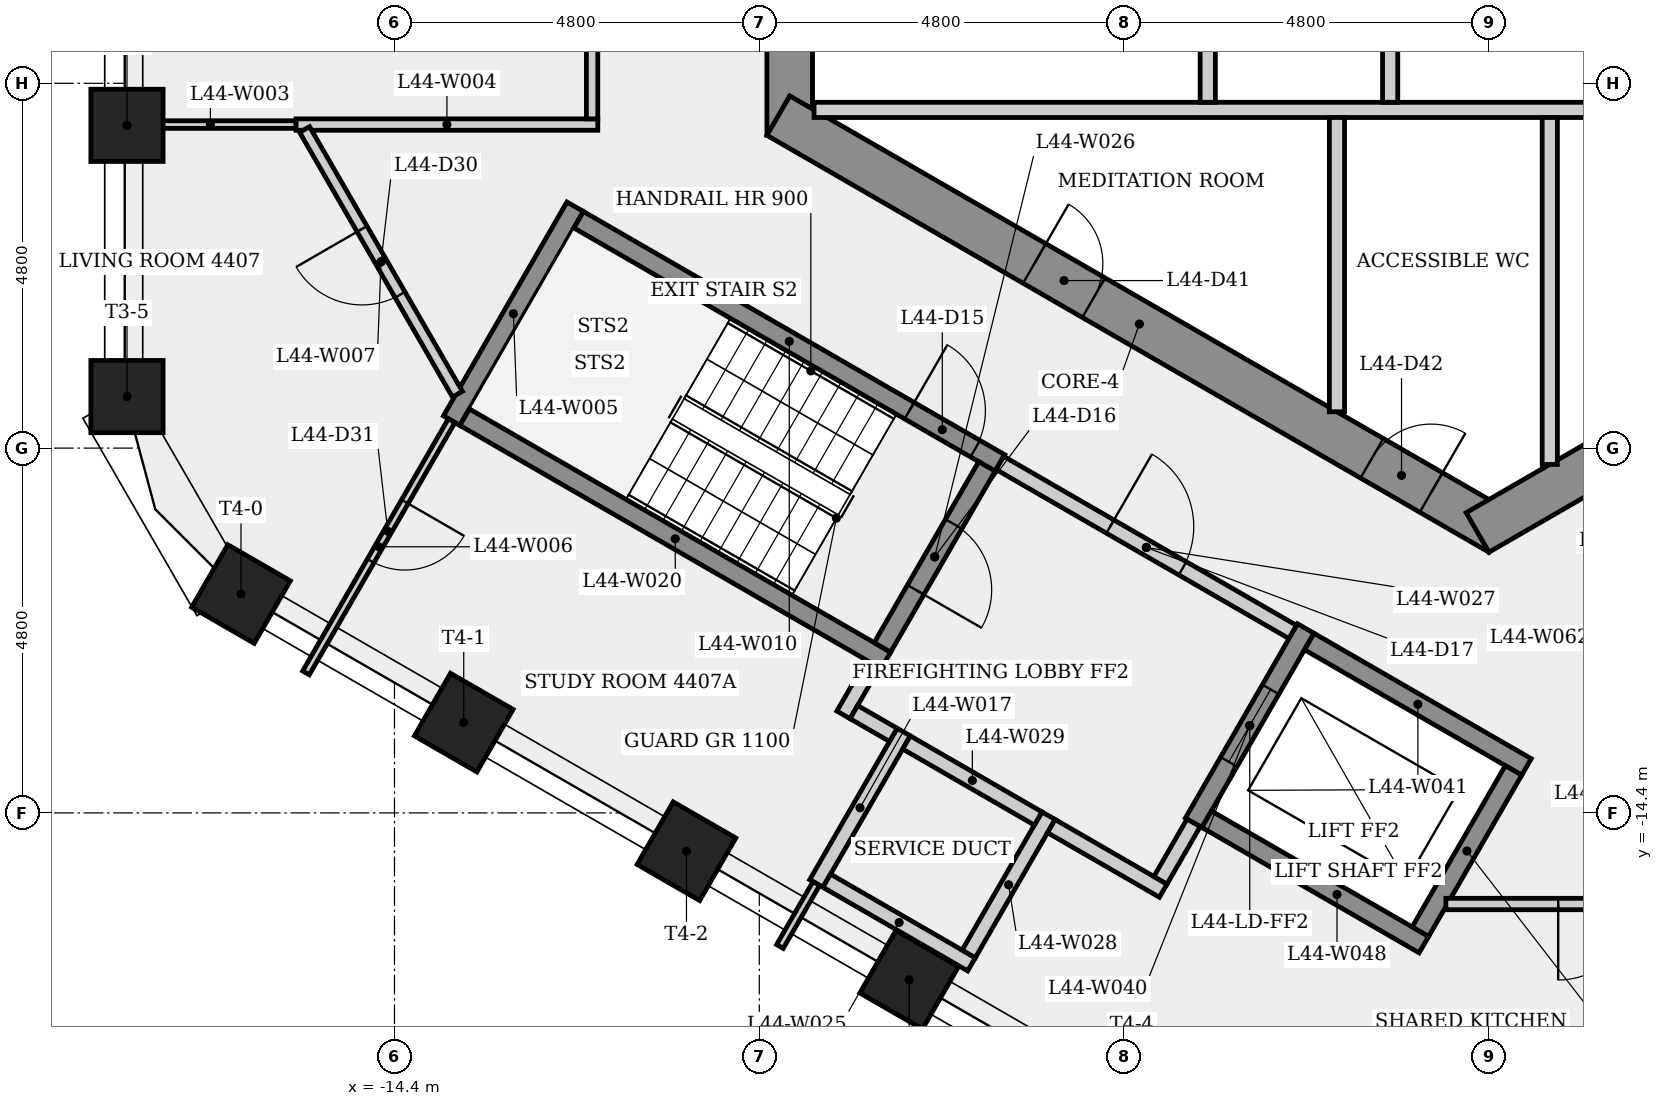
"""IFC4 building model, lengths in metres.
Left out: names, types, materials, properties, quantities, classifications, styles, units other than length and angle.
Written with IfcOpenShell. Run it as: python <this file> out.ifc"""

import sys

from ifc_helpers import new_model, si_unit, direction, frame, frame_2d, origin, origin_2d, place, context, subcontext, project, spatial, rectangle, extrude, element, fill, save


model = new_model("IFC4")
c1 = context("Model", 3, precision=1e-05, world=origin(), true_north=direction((0.0, 1.0)))
c2 = subcontext(c1, "Body", "Model", "MODEL_VIEW")
j1 = project(units=[si_unit("LENGTHUNIT", "METRE"), si_unit("PLANEANGLEUNIT", "RADIAN")], contexts=[c1])
p1 = place(None, origin())
s1 = spatial("IfcSite", under=j1, at=p1, CompositionType="ELEMENT")
p2 = place(p1, origin())
s2 = spatial("IfcBuilding", under=s1, at=p2, CompositionType="ELEMENT")
p3 = place(p2, frame((0.0, 0.0, 166.3)))
s3 = spatial("IfcBuildingStorey", under=s2, at=p3, CompositionType="ELEMENT", Elevation=166.3)
p4 = place(p3, frame((-9.2, 5.485, 0.0), z_axis=(0.0, 0.0, 1.0), x_axis=(0.0, -1.0, 0.0)))
e1 = element("IfcWall", 1, at=p4, inside=s3, PredefinedType="SHEAR", context=c2, shape_type="SweptSolid", body=[
    extrude(rectangle(XDim=10.97, YDim=0.6, at=frame_2d((5.485, 0.0))), origin(), (0.0, 0.0, 1.0), 3.4),
])
p5 = place(p4, frame((8.516, 0.0, 0.0)))
e2 = element("IfcOpeningElement", 2, at=p5, cuts=e1, PredefinedType="OPENING", context=c2, shape_type="SweptSolid", body=[
    extrude(rectangle(XDim=0.9, YDim=2.1, at=frame_2d((0.45, 1.05))), frame((0.0, 0.31, 0.0), z_axis=(0.0, -1.0, 0.0), x_axis=(1.0, 0.0, 0.0)), (0.0, 0.0, 1.0), 0.62),
])
p6 = place(p4, frame((4.685, 0.0, 0.0)))
e3 = element("IfcOpeningElement", 3, at=p6, cuts=e1, PredefinedType="OPENING", context=c2, shape_type="SweptSolid", body=[
    extrude(rectangle(XDim=1.6, YDim=2.1, at=frame_2d((0.8, 1.05))), frame((0.0, 0.31, 0.0), z_axis=(0.0, -1.0, 0.0), x_axis=(1.0, 0.0, 0.0)), (0.0, 0.0, 1.0), 0.62),
])
p7 = place(p3, frame((-9.35, -5.225, 0.0), z_axis=(0.0, 0.0, 1.0), x_axis=(0.866023993627, -0.500002442456, 0.0)))
e4 = element("IfcWall", 4, at=p7, inside=s3, PredefinedType="SHEAR", context=c2, shape_type="SweptSolid", body=[
    extrude(rectangle(XDim=10.97, YDim=0.6, at=frame_2d((5.485, 0.0))), origin(), (0.0, 0.0, 1.0), 3.4),
])
p8 = place(p7, frame((3.891, 0.0, 0.0)))
e5 = element("IfcOpeningElement", 5, at=p8, cuts=e4, PredefinedType="OPENING", context=c2, shape_type="SweptSolid", body=[
    extrude(rectangle(XDim=0.9, YDim=2.1, at=frame_2d((0.45, 1.05))), frame((0.0, 0.31, 0.0), z_axis=(0.0, -1.0, 0.0), x_axis=(1.0, 0.0, 0.0)), (0.0, 0.0, 1.0), 0.62),
])
p9 = place(p7, frame((9.018, 0.0, 0.0)))
e6 = element("IfcOpeningElement", 6, at=p9, cuts=e4, PredefinedType="OPENING", context=c2, shape_type="SweptSolid", body=[
    extrude(rectangle(XDim=0.9, YDim=2.1, at=frame_2d((0.45, 1.05))), frame((0.0, 0.31, 0.0), z_axis=(0.0, -1.0, 0.0), x_axis=(1.0, 0.0, 0.0)), (0.0, 0.0, 1.0), 0.62),
])
p10 = place(p3, frame((-0.15, -10.71, 0.0), z_axis=(0.0, 0.0, 1.0), x_axis=(0.866023993627, 0.500002442456, 0.0)))
e7 = element("IfcWall", 7, at=p10, inside=s3, PredefinedType="SHEAR", context=c2, shape_type="SweptSolid", body=[
    extrude(rectangle(XDim=10.97, YDim=0.6, at=frame_2d((5.485, 0.0))), origin(), (0.0, 0.0, 1.0), 3.4),
])
p11 = place(p10, frame((7.166, 0.0, 0.0)))
e8 = element("IfcOpeningElement", 8, at=p11, cuts=e7, PredefinedType="OPENING", context=c2, shape_type="SweptSolid", body=[
    extrude(rectangle(XDim=0.9, YDim=2.1, at=frame_2d((0.45, 1.05))), frame((0.0, 0.31, 0.0), z_axis=(0.0, -1.0, 0.0), x_axis=(1.0, 0.0, 0.0)), (0.0, 0.0, 1.0), 0.62),
])
for number, where, z_axis, x_axis in (
    (9, (-17.919, -5.353, 0.0), (0.0, 0.0, 1.0), (-1.0, 0.0, 0.0)),
    (10, (-17.919, -8.922, 0.0), (0.0, 0.0, 1.0), (-1.0, 0.0, 0.0)),
    (11, (-16.419, -11.52, 0.0), (0.0, 0.0, 1.0), (-0.5, -0.866, 0.0)),
    (12, (-13.489, -13.212, 0.0), (0.0, 0.0, 1.0), (-0.5, -0.866, 0.0)),
    (13, (-10.559, -14.904, 0.0), (0.0, 0.0, 1.0), (-0.5, -0.866, 0.0)),
    (14, (-7.628, -16.596, 0.0), (0.0, 0.0, 1.0), (-0.5, -0.866, 0.0)),
):
    element("IfcColumn", number, at=place(p3, frame(where, z_axis=z_axis, x_axis=x_axis)), inside=s3, PredefinedType="COLUMN", context=c2, shape_type="SweptSolid", body=[
        extrude(rectangle(XDim=0.95, YDim=0.95, at=origin_2d()), origin(), (0.0, 0.0, 1.0), 3.4),
    ])
p12 = place(p3, frame((-15.695, -5.343, 0.0), z_axis=(0.0, 0.0, 1.0), x_axis=(-1.0, 0.0, 0.0)))
e15 = element("IfcWall", 15, at=p12, inside=s3, PredefinedType="PARTITIONING", context=c2, shape_type="SweptSolid", body=[
    extrude(rectangle(XDim=2.254, YDim=0.1, at=frame_2d((1.127, 0.0))), origin(), (0.0, 0.0, 1.0), 3.05),
])
p13 = place(p3, frame((-15.695, -5.343, 0.0), z_axis=(0.0, 0.0, 1.0), x_axis=(1.0, 0.0, 0.0)))
e16 = element("IfcWall", 16, at=p13, inside=s3, PredefinedType="PARTITIONING", context=c2, shape_type="SweptSolid", body=[
    extrude(rectangle(XDim=3.97, YDim=0.15, at=frame_2d((1.985, 0.0))), origin(), (0.0, 0.0, 1.0), 3.05),
])
p14 = place(p3, frame((-13.648, -9.239, 0.0), z_axis=(0.0, 0.0, 1.0), x_axis=(0.500017246033, 0.866015446554, 0.0)))
e17 = element("IfcWall", 17, at=p14, inside=s3, PredefinedType="SHEAR", context=c2, shape_type="SweptSolid", body=[
    extrude(rectangle(XDim=3.25, YDim=0.25, at=frame_2d((1.625, 0.0))), origin(), (0.0, 0.0, 1.0), 3.05),
])
p15 = place(p3, frame((-13.648, -9.239, 0.0), z_axis=(0.0, 0.0, 1.0), x_axis=(-0.500044099915, -0.86599994119, 0.0)))
e18 = element("IfcWall", 18, at=p15, inside=s3, PredefinedType="PARTITIONING", context=c2, shape_type="SweptSolid", body=[
    extrude(rectangle(XDim=3.833, YDim=0.1, at=frame_2d((1.917, 0.0))), origin(), (0.0, 0.0, 1.0), 3.05),
])
p16 = place(p15, frame((1.231, 0.0, 0.0)))
e19 = element("IfcOpeningElement", 19, at=p16, cuts=e18, PredefinedType="OPENING", context=c2, shape_type="SweptSolid", body=[
    extrude(rectangle(XDim=0.9, YDim=2.1, at=frame_2d((0.45, 1.05))), frame((0.0, 0.06, 0.0), z_axis=(0.0, -1.0, 0.0), x_axis=(1.0, 0.0, 0.0)), (0.0, 0.0, 1.0), 0.12),
])
p17 = place(p3, frame((-13.572, -8.891, 0.0), z_axis=(0.0, 0.0, 1.0), x_axis=(-0.500004480819, 0.866022816767, 0.0)))
e20 = element("IfcWall", 20, at=p17, inside=s3, PredefinedType="PARTITIONING", context=c2, shape_type="SweptSolid", body=[
    extrude(rectangle(XDim=4.021, YDim=0.15, at=frame_2d((2.011, 0.0))), origin(), (0.0, 0.0, 1.0), 3.05),
])
p18 = place(p17, frame((1.511, 0.0, 0.0)))
e21 = element("IfcOpeningElement", 21, at=p18, cuts=e20, PredefinedType="OPENING", context=c2, shape_type="SweptSolid", body=[
    extrude(rectangle(XDim=1.0, YDim=2.1, at=frame_2d((0.5, 1.05))), frame((0.0, 0.085, 0.0), z_axis=(0.0, -1.0, 0.0), x_axis=(1.0, 0.0, 0.0)), (0.0, 0.0, 1.0), 0.17),
])
p19 = place(p3, frame((-11.977, -6.595, 0.0), z_axis=(0.0, 0.0, 1.0), x_axis=(0.866025499775, -0.499999833739, 0.0)))
e22 = element("IfcWall", 22, at=p19, inside=s3, PredefinedType="SHEAR", context=c2, shape_type="SweptSolid", body=[
    extrude(rectangle(XDim=6.4, YDim=0.25, at=frame_2d((3.2, 0.0))), origin(), (0.0, 0.0, 1.0), 3.05),
])
p20 = place(p19, frame((5.025, 0.0, 0.0)))
e23 = element("IfcOpeningElement", 23, at=p20, cuts=e22, PredefinedType="OPENING", context=c2, shape_type="SweptSolid", body=[
    extrude(rectangle(XDim=1.0, YDim=2.1, at=frame_2d((0.5, 1.05))), frame((0.0, 0.135, 0.0), z_axis=(0.0, -1.0, 0.0), x_axis=(1.0, 0.0, 0.0)), (0.0, 0.0, 1.0), 0.27),
])
p21 = place(p3, frame((-11.8, -5.268, 0.0), z_axis=(0.0, 0.0, 1.0), x_axis=(0.0, 1.0, 0.0)))
e24 = element("IfcWall", 24, at=p21, inside=s3, PredefinedType="PARTITIONING", context=c2, shape_type="SweptSolid", body=[
    extrude(rectangle(XDim=10.686, YDim=0.15, at=frame_2d((5.343, 0.0))), origin(), (0.0, 0.0, 1.0), 3.05),
])
p22 = place(p21, frame((6.585, 0.0, 0.0)))
e25 = element("IfcOpeningElement", 25, at=p22, cuts=e24, PredefinedType="OPENING", context=c2, shape_type="SweptSolid", body=[
    extrude(rectangle(XDim=1.0, YDim=2.1, at=frame_2d((0.5, 1.05))), frame((0.0, 0.085, 0.0), z_axis=(0.0, -1.0, 0.0), x_axis=(1.0, 0.0, 0.0)), (0.0, 0.0, 1.0), 0.17),
])
p23 = place(p21, frame((1.264, 0.0, 0.0)))
e26 = element("IfcOpeningElement", 26, at=p23, cuts=e24, PredefinedType="OPENING", context=c2, shape_type="SweptSolid", body=[
    extrude(rectangle(XDim=1.0, YDim=2.1, at=frame_2d((0.5, 1.05))), frame((0.0, 0.085, 0.0), z_axis=(0.0, -1.0, 0.0), x_axis=(1.0, 0.0, 0.0)), (0.0, 0.0, 1.0), 0.17),
])
p24 = place(p3, frame((-8.88, -5.15, 0.0), z_axis=(0.0, 0.0, 1.0), x_axis=(1.0, 0.0, 0.0)))
e27 = element("IfcWall", 27, at=p24, inside=s3, PredefinedType="PARTITIONING", context=c2, shape_type="SweptSolid", body=[
    extrude(rectangle(XDim=11.205, YDim=0.2, at=frame_2d((5.603, 0.0))), origin(), (0.0, 0.0, 1.0), 3.05),
])
p25 = place(p3, frame((-8.85, -15.329, 0.0), z_axis=(0.0, 0.0, 1.0), x_axis=(0.500077740698, 0.865980515519, 0.0)))
e28 = element("IfcWall", 28, at=p25, inside=s3, PredefinedType="PLUMBINGWALL", context=c2, shape_type="SweptSolid", body=[
    extrude(rectangle(XDim=2.3, YDim=0.2, at=frame_2d((1.15, 0.0))), origin(), (0.0, 0.0, 1.0), 3.05),
])
p26 = place(p3, frame((-8.85, -15.329, 0.0), z_axis=(0.0, 0.0, 1.0), x_axis=(-0.499950501706, -0.866053979752, 0.0)))
e29 = element("IfcWall", 29, at=p26, inside=s3, PredefinedType="PARTITIONING", context=c2, shape_type="SweptSolid", body=[
    extrude(rectangle(XDim=0.958, YDim=0.1, at=frame_2d((0.479, 0.0))), origin(), (0.0, 0.0, 1.0), 3.05),
])
p27 = place(p3, frame((-8.493, -13.11, 0.0), z_axis=(0.0, 0.0, 1.0), x_axis=(0.500067724834, 0.865986299303, 0.0)))
e30 = element("IfcWall", 30, at=p27, inside=s3, PredefinedType="PARTITIONING", context=c2, shape_type="SweptSolid", body=[
    extrude(rectangle(XDim=0.775, YDim=0.2, at=frame_2d((0.388, 0.0))), origin(), (0.0, 0.0, 1.0), 3.05),
])
p28 = place(p3, frame((-7.935, -12.393, 0.0), z_axis=(0.0, 0.0, 1.0), x_axis=(-0.866025499775, 0.499999833739, 0.0)))
e31 = element("IfcWall", 31, at=p28, inside=s3, PredefinedType="SHEAR", context=c2, shape_type="SweptSolid", body=[
    extrude(rectangle(XDim=6.4, YDim=0.25, at=frame_2d((3.2, 0.0))), origin(), (0.0, 0.0, 1.0), 3.05),
])
p29 = place(p3, frame((-7.836, -13.373, 0.0), z_axis=(0.0, 0.0, 1.0), x_axis=(-0.866232998003, 0.499640263761, 0.0)))
e32 = element("IfcWall", 32, at=p29, inside=s3, PredefinedType="PARTITIONING", context=c2, shape_type="SweptSolid", body=[
    extrude(rectangle(XDim=0.6, YDim=0.2, at=frame_2d((0.3, 0.0))), origin(), (0.0, 0.0, 1.0), 3.05),
])
p30 = place(p3, frame((-6.808, -16.392, 0.0), z_axis=(0.0, 0.0, 1.0), x_axis=(-0.866008176907, 0.50002983664, 0.0)))
e33 = element("IfcWall", 33, at=p30, inside=s3, PredefinedType="PLUMBINGWALL", context=c2, shape_type="SweptSolid", body=[
    extrude(rectangle(XDim=2.2, YDim=0.2, at=frame_2d((1.1, 0.0))), origin(), (0.0, 0.0, 1.0), 3.05),
])
p31 = place(p3, frame((-6.605, -9.841, 0.0), z_axis=(0.0, 0.0, 1.0), x_axis=(-0.499996545922, -0.866027397988, 0.0)))
e34 = element("IfcWall", 34, at=p31, inside=s3, PredefinedType="SHEAR", context=c2, shape_type="SweptSolid", body=[
    extrude(rectangle(XDim=2.75, YDim=0.25, at=frame_2d((1.375, 0.0))), origin(), (0.0, 0.0, 1.0), 3.05),
])
p32 = place(p31, frame((0.875, 0.0, 0.0)))
e35 = element("IfcOpeningElement", 35, at=p32, cuts=e34, PredefinedType="OPENING", context=c2, shape_type="SweptSolid", body=[
    extrude(rectangle(XDim=1.0, YDim=2.1, at=frame_2d((0.5, 1.05))), frame((0.0, 0.135, 0.0), z_axis=(0.0, -1.0, 0.0), x_axis=(1.0, 0.0, 0.0)), (0.0, 0.0, 1.0), 0.27),
])
p33 = place(p3, frame((-6.435, -9.795, 0.0), z_axis=(0.0, 0.0, 1.0), x_axis=(0.866012907634, -0.500021643343, 0.0)))
e36 = element("IfcWall", 36, at=p33, inside=s3, PredefinedType="PARTITIONING", context=c2, shape_type="SweptSolid", body=[
    extrude(rectangle(XDim=4.45, YDim=0.2, at=frame_2d((2.225, 0.0))), origin(), (0.0, 0.0, 1.0), 3.05),
])
p34 = place(p33, frame((1.675, 0.0, 0.0)))
e37 = element("IfcOpeningElement", 37, at=p34, cuts=e36, PredefinedType="OPENING", context=c2, shape_type="SweptSolid", body=[
    extrude(rectangle(XDim=1.1, YDim=2.1, at=frame_2d((0.55, 1.05))), frame((0.0, 0.11, 0.0), z_axis=(0.0, -1.0, 0.0), x_axis=(1.0, 0.0, 0.0)), (0.0, 0.0, 1.0), 0.22),
])
p35 = place(p3, frame((-5.795, -14.437, 0.0), z_axis=(0.0, 0.0, 1.0), x_axis=(-0.500027713859, -0.866009402589, 0.0)))
e38 = element("IfcWall", 38, at=p35, inside=s3, PredefinedType="PLUMBINGWALL", context=c2, shape_type="SweptSolid", body=[
    extrude(rectangle(XDim=2.1, YDim=0.2, at=frame_2d((1.05, 0.0))), origin(), (0.0, 0.0, 1.0), 3.05),
])
p36 = place(p3, frame((-5.931, -14.473, 0.0), z_axis=(0.0, 0.0, 1.0), x_axis=(-0.866041268327, 0.499972520799, 0.0)))
e39 = element("IfcWall", 39, at=p36, inside=s3, PredefinedType="PLUMBINGWALL", context=c2, shape_type="SweptSolid", body=[
    extrude(rectangle(XDim=2.0, YDim=0.2, at=frame_2d((1.0, 0.0))), origin(), (0.0, 0.0, 1.0), 3.05),
])
p37 = place(p3, frame((-4.286, -15.423, 0.0), z_axis=(0.0, 0.0, 1.0), x_axis=(-0.866025371046, 0.500000056704, 0.0)))
e40 = element("IfcWall", 40, at=p37, inside=s3, PredefinedType="PARTITIONING", context=c2, shape_type="SweptSolid", body=[
    extrude(rectangle(XDim=1.7, YDim=0.2, at=frame_2d((0.85, 0.0))), origin(), (0.0, 0.0, 1.0), 3.05),
])
p38 = place(p3, frame((-3.885, -14.529, 0.0), z_axis=(0.0, 0.0, 1.0), x_axis=(-0.499859285417, -0.866106630146, 0.0)))
e41 = element("IfcWall", 41, at=p38, inside=s3, PredefinedType="PARTITIONING", context=c2, shape_type="SweptSolid", body=[
    extrude(rectangle(XDim=0.875, YDim=0.2, at=frame_2d((0.438, 0.0))), origin(), (0.0, 0.0, 1.0), 3.05),
])
p39 = place(p3, frame((-3.7, -1.9, 0.0), z_axis=(0.0, 0.0, 1.0), x_axis=(0.0, -1.0, 0.0)))
e42 = element("IfcWall", 42, at=p39, inside=s3, PredefinedType="PARTITIONING", context=c2, shape_type="SweptSolid", body=[
    extrude(rectangle(XDim=3.15, YDim=0.2, at=frame_2d((1.575, 0.0))), origin(), (0.0, 0.0, 1.0), 3.05),
])
p40 = place(p3, frame((-2.41, -11.974, 0.0), z_axis=(0.0, 0.0, 1.0), x_axis=(-0.500001826776, -0.866024349092, 0.0)))
e43 = element("IfcWall", 43, at=p40, inside=s3, PredefinedType="SHEAR", context=c2, shape_type="SweptSolid", body=[
    extrude(rectangle(XDim=2.95, YDim=0.25, at=frame_2d((1.475, 0.0))), origin(), (0.0, 0.0, 1.0), 3.05),
])
p41 = place(p40, frame((0.925, 0.0, 0.0)))
e44 = element("IfcOpeningElement", 44, at=p41, cuts=e43, PredefinedType="OPENING", context=c2, shape_type="SweptSolid", body=[
    extrude(rectangle(XDim=1.1, YDim=2.1, at=frame_2d((0.55, 1.05))), frame((0.0, 0.135, 0.0), z_axis=(0.0, -1.0, 0.0), x_axis=(1.0, 0.0, 0.0)), (0.0, 0.0, 1.0), 0.27),
])
p42 = place(p3, frame((-2.364, -12.145, 0.0), z_axis=(0.0, 0.0, 1.0), x_axis=(0.866040211805, -0.499974350878, 0.0)))
e45 = element("IfcWall", 45, at=p42, inside=s3, PredefinedType="SHEAR", context=c2, shape_type="SweptSolid", body=[
    extrude(rectangle(XDim=3.3, YDim=0.25, at=frame_2d((1.65, 0.0))), origin(), (0.0, 0.0, 1.0), 3.05),
])
p43 = place(p3, frame((-2.0, -5.25, 0.0), z_axis=(0.0, 0.0, 1.0), x_axis=(0.0, -1.0, 0.0)))
e46 = element("IfcWall", 46, at=p43, inside=s3, PredefinedType="PARTITIONING", context=c2, shape_type="SweptSolid", body=[
    extrude(rectangle(XDim=3.872, YDim=0.2, at=frame_2d((1.936, 0.0))), origin(), (0.0, 0.0, 1.0), 3.05),
])
p44 = place(p3, frame((-1.3, -1.9, 0.0), z_axis=(0.0, 0.0, 1.0), x_axis=(0.0, -1.0, 0.0)))
e47 = element("IfcWall", 47, at=p44, inside=s3, PredefinedType="PARTITIONING", context=c2, shape_type="SweptSolid", body=[
    extrude(rectangle(XDim=3.15, YDim=0.2, at=frame_2d((1.575, 0.0))), origin(), (0.0, 0.0, 1.0), 3.05),
])
p45 = place(p3, frame((-0.856, -16.133, 0.0), z_axis=(0.0, 0.0, 1.0), x_axis=(-0.866021716278, 0.500006386895, 0.0)))
e48 = element("IfcWall", 48, at=p45, inside=s3, PredefinedType="SHEAR", context=c2, shape_type="SweptSolid", body=[
    extrude(rectangle(XDim=3.3, YDim=0.25, at=frame_2d((1.65, 0.0))), origin(), (0.0, 0.0, 1.0), 3.05),
])
p46 = place(p3, frame((-0.902, -15.962, 0.0), z_axis=(0.0, 0.0, 1.0), x_axis=(0.500061746146, 0.865989751695, 0.0)))
e49 = element("IfcWall", 49, at=p46, inside=s3, PredefinedType="SHEAR", context=c2, shape_type="SweptSolid", body=[
    extrude(rectangle(XDim=2.45, YDim=0.25, at=frame_2d((1.225, 0.0))), origin(), (0.0, 0.0, 1.0), 3.4),
])
p47 = place(p3, frame((0.8, -5.25, 0.0), z_axis=(0.0, 0.0, 1.0), x_axis=(0.0, -1.0, 0.0)))
e50 = element("IfcWall", 50, at=p47, inside=s3, PredefinedType="PARTITIONING", context=c2, shape_type="SweptSolid", body=[
    extrude(rectangle(XDim=4.565, YDim=0.2, at=frame_2d((2.282, 0.0))), origin(), (0.0, 0.0, 1.0), 3.05),
])
p48 = place(p3, frame((3.388, -15.599, 0.0), z_axis=(0.0, 0.0, 1.0), x_axis=(-1.0, 0.0, 0.0)))
e51 = element("IfcWall", 51, at=p48, inside=s3, PredefinedType="PARTITIONING", context=c2, shape_type="SweptSolid", body=[
    extrude(rectangle(XDim=3.956, YDim=0.15, at=frame_2d((1.978, 0.0))), origin(), (0.0, 0.0, 1.0), 3.05),
])
p49 = place(p48, frame((1.478, 0.0, 0.0)))
e52 = element("IfcOpeningElement", 52, at=p49, cuts=e51, PredefinedType="OPENING", context=c2, shape_type="SweptSolid", body=[
    extrude(rectangle(XDim=1.0, YDim=2.1, at=frame_2d((0.5, 1.05))), frame((0.0, 0.085, 0.0), z_axis=(0.0, -1.0, 0.0), x_axis=(1.0, 0.0, 0.0)), (0.0, 0.0, 1.0), 0.17),
])
p50 = place(p20, origin())
e53 = element("IfcDoor", 53, at=p50, inside=s3, OperationType="SINGLE_SWING_LEFT", PredefinedType="DOOR", context=c2, shape_type="SweptSolid", body=[
    extrude(rectangle(XDim=1.0, YDim=2.1, at=frame_2d((0.5, 1.05))), frame((0.0, 0.025, 0.0), z_axis=(0.0, -1.0, 0.0), x_axis=(1.0, 0.0, 0.0)), (0.0, 0.0, 1.0), 0.05),
])
fill(e23, e53)
p51 = place(p32, origin())
e54 = element("IfcDoor", 54, at=p51, inside=s3, OperationType="SINGLE_SWING_RIGHT", PredefinedType="DOOR", context=c2, shape_type="SweptSolid", body=[
    extrude(rectangle(XDim=1.0, YDim=2.1, at=frame_2d((0.5, 1.05))), frame((0.0, 0.025, 0.0), z_axis=(0.0, -1.0, 0.0), x_axis=(1.0, 0.0, 0.0)), (0.0, 0.0, 1.0), 0.05),
])
fill(e35, e54)
p52 = place(p34, origin())
e55 = element("IfcDoor", 55, at=p52, inside=s3, OperationType="SINGLE_SWING_LEFT", PredefinedType="DOOR", context=c2, shape_type="SweptSolid", body=[
    extrude(rectangle(XDim=1.1, YDim=2.1, at=frame_2d((0.55, 1.05))), frame((0.0, 0.025, 0.0), z_axis=(0.0, -1.0, 0.0), x_axis=(1.0, 0.0, 0.0)), (0.0, 0.0, 1.0), 0.05),
])
fill(e37, e55)
p53 = place(p41, origin())
e56 = element("IfcDoor", 56, at=p53, inside=s3, OperationType="SLIDING_TO_LEFT", PredefinedType="DOOR", context=c2, shape_type="SweptSolid", body=[
    extrude(rectangle(XDim=1.1, YDim=2.1, at=frame_2d((0.55, 1.05))), frame((0.0, 0.025, 0.0), z_axis=(0.0, -1.0, 0.0), x_axis=(1.0, 0.0, 0.0)), (0.0, 0.0, 1.0), 0.05),
])
fill(e44, e56)
p54 = place(p18, origin())
e57 = element("IfcDoor", 57, at=p54, inside=s3, OperationType="SINGLE_SWING_RIGHT", PredefinedType="DOOR", context=c2, shape_type="SweptSolid", body=[
    extrude(rectangle(XDim=1.0, YDim=2.1, at=frame_2d((0.5, 1.05))), frame((0.0, 0.025, 0.0), z_axis=(0.0, -1.0, 0.0), x_axis=(1.0, 0.0, 0.0)), (0.0, 0.0, 1.0), 0.05),
])
fill(e21, e57)
p55 = place(p16, origin())
e58 = element("IfcDoor", 58, at=p55, inside=s3, OperationType="SINGLE_SWING_LEFT", PredefinedType="DOOR", context=c2, shape_type="SweptSolid", body=[
    extrude(rectangle(XDim=0.9, YDim=2.1, at=frame_2d((0.45, 1.05))), frame((0.0, 0.025, 0.0), z_axis=(0.0, -1.0, 0.0), x_axis=(1.0, 0.0, 0.0)), (0.0, 0.0, 1.0), 0.05),
])
fill(e19, e58)
p56 = place(p49, origin())
e59 = element("IfcDoor", 59, at=p56, inside=s3, OperationType="SINGLE_SWING_RIGHT", PredefinedType="DOOR", context=c2, shape_type="SweptSolid", body=[
    extrude(rectangle(XDim=1.0, YDim=2.1, at=frame_2d((0.5, 1.05))), frame((0.0, 0.025, 0.0), z_axis=(0.0, -1.0, 0.0), x_axis=(1.0, 0.0, 0.0)), (0.0, 0.0, 1.0), 0.05),
])
fill(e52, e59)
p57 = place(p8, origin())
e60 = element("IfcDoor", 60, at=p57, inside=s3, OperationType="SINGLE_SWING_LEFT", PredefinedType="DOOR", context=c2, shape_type="SweptSolid", body=[
    extrude(rectangle(XDim=0.9, YDim=2.1, at=frame_2d((0.45, 1.05))), frame((0.0, 0.025, 0.0), z_axis=(0.0, -1.0, 0.0), x_axis=(1.0, 0.0, 0.0)), (0.0, 0.0, 1.0), 0.05),
])
fill(e5, e60)
p58 = place(p9, origin())
e61 = element("IfcDoor", 61, at=p58, inside=s3, OperationType="SINGLE_SWING_RIGHT", PredefinedType="DOOR", context=c2, shape_type="SweptSolid", body=[
    extrude(rectangle(XDim=0.9, YDim=2.1, at=frame_2d((0.45, 1.05))), frame((0.0, 0.025, 0.0), z_axis=(0.0, -1.0, 0.0), x_axis=(1.0, 0.0, 0.0)), (0.0, 0.0, 1.0), 0.05),
])
fill(e6, e61)
save(model, sys.argv[1])
